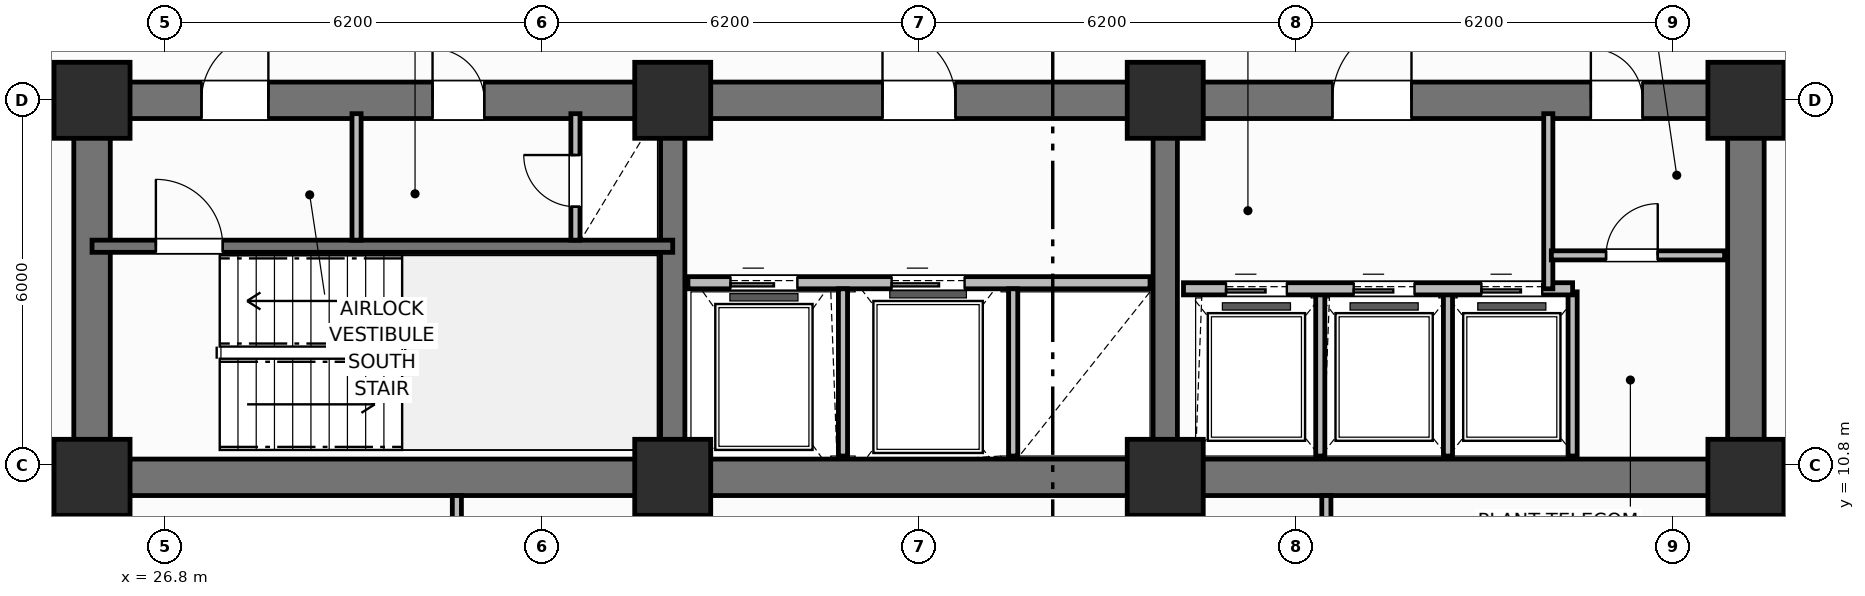
"""IFC4 building model, lengths in metres.
Left out: names, types, materials, properties, quantities, classifications, styles, units other than length and angle.
Written with IfcOpenShell. Run it as: python <this file> out.ifc"""

import sys

from ifc_helpers import new_model, si_unit, direction, frame, frame_2d, origin, origin_2d, place, context, subcontext, project, spatial, rectangle, extrude, element, fill, save


model = new_model("IFC4")
c1 = context("Model", 3, precision=1e-05, world=origin(), true_north=direction((0.0, 1.0)))
c2 = subcontext(c1, "Body", "Model", "MODEL_VIEW")
j1 = project(units=[si_unit("LENGTHUNIT", "METRE"), si_unit("PLANEANGLEUNIT", "RADIAN")], contexts=[c1])
p1 = place(None, origin())
s1 = spatial("IfcSite", under=j1, at=p1, CompositionType="ELEMENT")
p2 = place(p1, origin())
s2 = spatial("IfcBuilding", under=s1, at=p2, CompositionType="ELEMENT")
p3 = place(p2, frame((0.0, 0.0, 51.0)))
s3 = spatial("IfcBuildingStorey", under=s2, at=p3, CompositionType="ELEMENT", Elevation=51.0)
p4 = place(p3, frame((52.8, 10.6, 0.0), z_axis=(0.0, 0.0, 1.0), x_axis=(-1.0, 0.0, 0.0)))
e1 = element("IfcWall", 1, at=p4, inside=s3, PredefinedType="SHEAR", context=c2, shape_type="SweptSolid", body=[
    extrude(rectangle(XDim=27.2, YDim=0.6, at=frame_2d((13.6, 0.0))), origin(), (0.0, 0.0, 1.0), 3.7),
])
for number, where, z_axis, x_axis in (
    (2, (25.6, 10.9, 0.0), (0.0, 0.0, 1.0), (0.0, 1.0, 0.0)),
    (3, (52.8, 10.9, 0.0), (0.0, 0.0, 1.0), (0.0, 1.0, 0.0)),
):
    element("IfcWall", number, at=place(p3, frame(where, z_axis=z_axis, x_axis=x_axis)), inside=s3, PredefinedType="SHEAR", context=c2, shape_type="SweptSolid", body=[
        extrude(rectangle(XDim=5.6, YDim=0.6, at=frame_2d((2.8, 0.0))), origin(), (0.0, 0.0, 1.0), 3.7),
    ])
p5 = place(p3, frame((25.6, 16.8, 0.0), z_axis=(0.0, 0.0, 1.0), x_axis=(1.0, 0.0, 0.0)))
e4 = element("IfcWall", 4, at=p5, inside=s3, PredefinedType="SHEAR", context=c2, shape_type="SweptSolid", body=[
    extrude(rectangle(XDim=27.2, YDim=0.6, at=frame_2d((13.6, 0.0))), origin(), (0.0, 0.0, 1.0), 3.7),
])
p6 = place(p5, frame((1.8, 0.0, 0.0)))
e5 = element("IfcOpeningElement", 5, at=p6, cuts=e4, PredefinedType="OPENING", context=c2, shape_type="SweptSolid", body=[
    extrude(rectangle(XDim=1.1, YDim=2.15, at=frame_2d((0.55, 1.075))), frame((0.0, 0.31, 0.0), z_axis=(0.0, -1.0, 0.0), x_axis=(1.0, 0.0, 0.0)), (0.0, 0.0, 1.0), 0.62),
])
p7 = place(p5, frame((5.6, 0.0, 0.0)))
e6 = element("IfcOpeningElement", 6, at=p7, cuts=e4, PredefinedType="OPENING", context=c2, shape_type="SweptSolid", body=[
    extrude(rectangle(XDim=0.85, YDim=2.1, at=frame_2d((0.425, 1.05))), frame((0.0, 0.31, 0.0), z_axis=(0.0, -1.0, 0.0), x_axis=(1.0, 0.0, 0.0)), (0.0, 0.0, 1.0), 0.62),
])
p8 = place(p5, frame((13.0, 0.0, 0.0)))
e7 = element("IfcOpeningElement", 7, at=p8, cuts=e4, PredefinedType="OPENING", context=c2, shape_type="SweptSolid", body=[
    extrude(rectangle(XDim=1.2, YDim=2.15, at=frame_2d((0.6, 1.075))), frame((0.0, 0.31, 0.0), z_axis=(0.0, -1.0, 0.0), x_axis=(1.0, 0.0, 0.0)), (0.0, 0.0, 1.0), 0.62),
])
p9 = place(p5, frame((20.4, 0.0, 0.0)))
e8 = element("IfcOpeningElement", 8, at=p9, cuts=e4, PredefinedType="OPENING", context=c2, shape_type="SweptSolid", body=[
    extrude(rectangle(XDim=1.3, YDim=2.2, at=frame_2d((0.65, 1.1))), frame((0.0, 0.31, 0.0), z_axis=(0.0, -1.0, 0.0), x_axis=(1.0, 0.0, 0.0)), (0.0, 0.0, 1.0), 0.62),
])
p10 = place(p5, frame((24.65, 0.0, 0.0)))
e9 = element("IfcOpeningElement", 9, at=p10, cuts=e4, PredefinedType="OPENING", context=c2, shape_type="SweptSolid", body=[
    extrude(rectangle(XDim=0.85, YDim=2.1, at=frame_2d((0.425, 1.05))), frame((0.0, 0.31, 0.0), z_axis=(0.0, -1.0, 0.0), x_axis=(1.0, 0.0, 0.0)), (0.0, 0.0, 1.0), 0.62),
])
for number, where, z_axis, x_axis in (
    (10, (35.15, 10.9, 0.0), (0.0, 0.0, 1.0), (0.0, 1.0, 0.0)),
    (11, (43.25, 10.9, 0.0), (0.0, 0.0, 1.0), (0.0, 1.0, 0.0)),
):
    element("IfcWall", number, at=place(p3, frame(where, z_axis=z_axis, x_axis=x_axis)), inside=s3, PredefinedType="SHEAR", context=c2, shape_type="SweptSolid", body=[
        extrude(rectangle(XDim=5.6, YDim=0.4, at=frame_2d((2.8, 0.0))), origin(), (0.0, 0.0, 1.0), 3.7),
    ])
for number, where, z_axis, x_axis in (
    (12, (25.6, 10.6, 0.0), (0.0, 0.0, 1.0), (1.0, 0.0, 0.0)),
    (13, (25.6, 16.8, 0.0), (0.0, 0.0, 1.0), (1.0, 0.0, 0.0)),
    (14, (35.15, 10.6, 0.0), (0.0, 0.0, 1.0), (1.0, 0.0, 0.0)),
    (15, (35.15, 16.8, 0.0), (0.0, 0.0, 1.0), (1.0, 0.0, 0.0)),
    (16, (43.25, 10.6, 0.0), (0.0, 0.0, 1.0), (1.0, 0.0, 0.0)),
    (17, (43.25, 16.8, 0.0), (0.0, 0.0, 1.0), (1.0, 0.0, 0.0)),
    (18, (52.8, 10.6, 0.0), (0.0, 0.0, 1.0), (1.0, 0.0, 0.0)),
    (19, (52.8, 16.8, 0.0), (0.0, 0.0, 1.0), (1.0, 0.0, 0.0)),
):
    element("IfcColumn", number, at=place(p3, frame(where, z_axis=z_axis, x_axis=x_axis)), inside=s3, PredefinedType="COLUMN", context=c2, shape_type="SweptSolid", body=[
        extrude(rectangle(XDim=1.25, YDim=1.25, at=origin_2d()), origin(), (0.0, 0.0, 1.0), 3.7),
    ])
p11 = place(p3, frame((25.6, 14.4, 0.0), z_axis=(0.0, 0.0, 1.0), x_axis=(1.0, 0.0, 0.0)))
e20 = element("IfcWall", 20, at=p11, inside=s3, PredefinedType="SHEAR", context=c2, shape_type="SweptSolid", body=[
    extrude(rectangle(XDim=9.55, YDim=0.2, at=frame_2d((4.775, 0.0))), origin(), (0.0, 0.0, 1.0), 3.7),
])
p12 = place(p11, frame((1.05, 0.0, 0.0)))
e21 = element("IfcOpeningElement", 21, at=p12, cuts=e20, PredefinedType="OPENING", context=c2, shape_type="SweptSolid", body=[
    extrude(rectangle(XDim=1.1, YDim=2.15, at=frame_2d((0.55, 1.075))), frame((0.0, 0.11, 0.0), z_axis=(0.0, -1.0, 0.0), x_axis=(1.0, 0.0, 0.0)), (0.0, 0.0, 1.0), 0.22),
])
p13 = place(p3, frame((29.95, 14.5, 0.0), z_axis=(0.0, 0.0, 1.0), x_axis=(0.0, 1.0, 0.0)))
e22 = element("IfcWall", 22, at=p13, inside=s3, PredefinedType="PARTITIONING", context=c2, shape_type="SweptSolid", body=[
    extrude(rectangle(XDim=2.08, YDim=0.15, at=frame_2d((1.04, 0.0))), origin(), (0.0, 0.0, 1.0), 2.53),
])
p14 = place(p3, frame((33.55, 14.5, 0.0), z_axis=(0.0, 0.0, 1.0), x_axis=(0.0, 1.0, 0.0)))
e23 = element("IfcWall", 23, at=p14, inside=s3, PredefinedType="PARTITIONING", context=c2, shape_type="SweptSolid", body=[
    extrude(rectangle(XDim=2.08, YDim=0.15, at=frame_2d((1.04, 0.0))), origin(), (0.0, 0.0, 1.0), 2.53),
])
p15 = place(p14, frame((0.55, 0.0, 0.0)))
e24 = element("IfcOpeningElement", 24, at=p15, cuts=e23, PredefinedType="OPENING", context=c2, shape_type="SweptSolid", body=[
    extrude(rectangle(XDim=0.85, YDim=2.05, at=frame_2d((0.425, 1.025))), frame((0.0, 0.085, 0.0), z_axis=(0.0, -1.0, 0.0), x_axis=(1.0, 0.0, 0.0)), (0.0, 0.0, 1.0), 0.17),
])
p16 = place(p3, frame((35.4, 13.8, 0.0), z_axis=(0.0, 0.0, 1.0), x_axis=(1.0, 0.0, 0.0)))
e25 = element("IfcWall", 25, at=p16, inside=s3, PredefinedType="PARTITIONING", context=c2, shape_type="SweptSolid", body=[
    extrude(rectangle(XDim=7.6, YDim=0.2, at=frame_2d((3.8, 0.0))), origin(), (0.0, 0.0, 1.0), 2.3),
])
p17 = place(p16, frame((0.7, 0.0, 0.0)))
e26 = element("IfcOpeningElement", 26, at=p17, cuts=e25, PredefinedType="OPENING", context=c2, shape_type="SweptSolid", body=[
    extrude(rectangle(XDim=1.1, YDim=2.15, at=frame_2d((0.55, 1.075))), frame((0.0, 0.11, 0.0), z_axis=(0.0, -1.0, 0.0), x_axis=(1.0, 0.0, 0.0)), (0.0, 0.0, 1.0), 0.22),
])
p18 = place(p16, frame((3.35, 0.0, 0.0)))
e27 = element("IfcOpeningElement", 27, at=p18, cuts=e25, PredefinedType="OPENING", context=c2, shape_type="SweptSolid", body=[
    extrude(rectangle(XDim=1.2, YDim=2.15, at=frame_2d((0.6, 1.075))), frame((0.0, 0.11, 0.0), z_axis=(0.0, -1.0, 0.0), x_axis=(1.0, 0.0, 0.0)), (0.0, 0.0, 1.0), 0.22),
])
for number, where, z_axis, x_axis in (
    (28, (37.95, 10.95, 0.0), (0.0, 0.0, 1.0), (0.0, 1.0, 0.0)),
    (29, (40.75, 10.95, 0.0), (0.0, 0.0, 1.0), (0.0, 1.0, 0.0)),
):
    element("IfcWall", number, at=place(p3, frame(where, z_axis=z_axis, x_axis=x_axis)), inside=s3, PredefinedType="PARTITIONING", context=c2, shape_type="SweptSolid", body=[
        extrude(rectangle(XDim=2.75, YDim=0.15, at=frame_2d((1.375, 0.0))), origin(), (0.0, 0.0, 1.0), 2.53),
    ])
for number, where, z_axis, x_axis in (
    (30, (45.8, 10.95, 0.0), (0.0, 0.0, 1.0), (0.0, 1.0, 0.0)),
    (31, (47.9, 10.95, 0.0), (0.0, 0.0, 1.0), (0.0, 1.0, 0.0)),
    (32, (49.95, 10.95, 0.0), (0.0, 0.0, 1.0), (0.0, 1.0, 0.0)),
):
    element("IfcWall", number, at=place(p3, frame(where, z_axis=z_axis, x_axis=x_axis)), inside=s3, PredefinedType="PARTITIONING", context=c2, shape_type="SweptSolid", body=[
        extrude(rectangle(XDim=2.7, YDim=0.15, at=frame_2d((1.35, 0.0))), origin(), (0.0, 0.0, 1.0), 2.53),
    ])
p19 = place(p3, frame((43.55, 13.7, 0.0), z_axis=(0.0, 0.0, 1.0), x_axis=(1.0, 0.0, 0.0)))
e33 = element("IfcWall", 33, at=p19, inside=s3, PredefinedType="PARTITIONING", context=c2, shape_type="SweptSolid", body=[
    extrude(rectangle(XDim=6.4, YDim=0.2, at=frame_2d((3.2, 0.0))), origin(), (0.0, 0.0, 1.0), 2.53),
])
p20 = place(p19, frame((0.7, 0.0, 0.0)))
e34 = element("IfcOpeningElement", 34, at=p20, cuts=e33, PredefinedType="OPENING", context=c2, shape_type="SweptSolid", body=[
    extrude(rectangle(XDim=1.0, YDim=2.15, at=frame_2d((0.5, 1.075))), frame((0.0, 0.11, 0.0), z_axis=(0.0, -1.0, 0.0), x_axis=(1.0, 0.0, 0.0)), (0.0, 0.0, 1.0), 0.22),
])
p21 = place(p19, frame((2.8, 0.0, 0.0)))
e35 = element("IfcOpeningElement", 35, at=p21, cuts=e33, PredefinedType="OPENING", context=c2, shape_type="SweptSolid", body=[
    extrude(rectangle(XDim=1.0, YDim=2.15, at=frame_2d((0.5, 1.075))), frame((0.0, 0.11, 0.0), z_axis=(0.0, -1.0, 0.0), x_axis=(1.0, 0.0, 0.0)), (0.0, 0.0, 1.0), 0.22),
])
p22 = place(p19, frame((4.9, 0.0, 0.0)))
e36 = element("IfcOpeningElement", 36, at=p22, cuts=e33, PredefinedType="OPENING", context=c2, shape_type="SweptSolid", body=[
    extrude(rectangle(XDim=1.0, YDim=2.15, at=frame_2d((0.5, 1.075))), frame((0.0, 0.11, 0.0), z_axis=(0.0, -1.0, 0.0), x_axis=(1.0, 0.0, 0.0)), (0.0, 0.0, 1.0), 0.22),
])
p23 = place(p3, frame((49.55, 13.7, 0.0), z_axis=(0.0, 0.0, 1.0), x_axis=(0.0, 1.0, 0.0)))
e37 = element("IfcWall", 37, at=p23, inside=s3, PredefinedType="PARTITIONING", context=c2, shape_type="SweptSolid", body=[
    extrude(rectangle(XDim=2.88, YDim=0.15, at=frame_2d((1.44, 0.0))), origin(), (0.0, 0.0, 1.0), 2.53),
])
p24 = place(p3, frame((49.6, 14.25, 0.0), z_axis=(0.0, 0.0, 1.0), x_axis=(1.0, 0.0, 0.0)))
e38 = element("IfcWall", 38, at=p24, inside=s3, PredefinedType="PARTITIONING", context=c2, shape_type="SweptSolid", body=[
    extrude(rectangle(XDim=2.85, YDim=0.15, at=frame_2d((1.425, 0.0))), origin(), (0.0, 0.0, 1.0), 2.53),
])
p25 = place(p24, frame((0.9, 0.0, 0.0)))
e39 = element("IfcOpeningElement", 39, at=p25, cuts=e38, PredefinedType="OPENING", context=c2, shape_type="SweptSolid", body=[
    extrude(rectangle(XDim=0.85, YDim=2.1, at=frame_2d((0.425, 1.05))), frame((0.0, 0.085, 0.0), z_axis=(0.0, -1.0, 0.0), x_axis=(1.0, 0.0, 0.0)), (0.0, 0.0, 1.0), 0.17),
])
p26 = place(p3, frame((31.6, 4.97, 0.0), z_axis=(0.0, 0.0, 1.0), x_axis=(0.0, 1.0, 0.0)))
e40 = element("IfcWall", 40, at=p26, inside=s3, PredefinedType="PARTITIONING", context=c2, shape_type="SweptSolid", body=[
    extrude(rectangle(XDim=5.33, YDim=0.15, at=frame_2d((2.665, 0.0))), origin(), (0.0, 0.0, 1.0), 2.53),
])
p27 = place(p26, frame((1.95, 0.0, 0.0)))
e41 = element("IfcOpeningElement", 41, at=p27, cuts=e40, PredefinedType="OPENING", context=c2, shape_type="SweptSolid", body=[
    extrude(rectangle(XDim=0.9, YDim=2.1, at=frame_2d((0.45, 1.05))), frame((0.0, 0.085, 0.0), z_axis=(0.0, -1.0, 0.0), x_axis=(1.0, 0.0, 0.0)), (0.0, 0.0, 1.0), 0.17),
])
p28 = place(p3, frame((45.9, 4.97, 0.0), z_axis=(0.0, 0.0, 1.0), x_axis=(0.0, 1.0, 0.0)))
e42 = element("IfcWall", 42, at=p28, inside=s3, PredefinedType="PARTITIONING", context=c2, shape_type="SweptSolid", body=[
    extrude(rectangle(XDim=5.33, YDim=0.15, at=frame_2d((2.665, 0.0))), origin(), (0.0, 0.0, 1.0), 2.53),
])
p29 = place(p3, frame((25.4, 6.27, 0.0), z_axis=(0.0, 0.0, 1.0), x_axis=(0.0, 1.0, 0.0)))
e43 = element("IfcWall", 43, at=p29, inside=s3, PredefinedType="PARTITIONING", context=c2, shape_type="SweptSolid", body=[
    extrude(rectangle(XDim=4.03, YDim=0.2, at=frame_2d((2.015, 0.0))), origin(), (0.0, 0.0, 1.0), 2.53),
])
p30 = place(p29, frame((0.65, 0.0, 0.0)))
e44 = element("IfcOpeningElement", 44, at=p30, cuts=e43, PredefinedType="OPENING", context=c2, shape_type="SweptSolid", body=[
    extrude(rectangle(XDim=0.9, YDim=2.1, at=frame_2d((0.45, 1.05))), frame((0.0, 0.11, 0.0), z_axis=(0.0, -1.0, 0.0), x_axis=(1.0, 0.0, 0.0)), (0.0, 0.0, 1.0), 0.22),
])
p31 = place(p3, frame((53.0, 6.27, 0.0), z_axis=(0.0, 0.0, 1.0), x_axis=(0.0, 1.0, 0.0)))
e45 = element("IfcWall", 45, at=p31, inside=s3, PredefinedType="PARTITIONING", context=c2, shape_type="SweptSolid", body=[
    extrude(rectangle(XDim=4.03, YDim=0.2, at=frame_2d((2.015, 0.0))), origin(), (0.0, 0.0, 1.0), 2.53),
])
p32 = place(p31, frame((0.65, 0.0, 0.0)))
e46 = element("IfcOpeningElement", 46, at=p32, cuts=e45, PredefinedType="OPENING", context=c2, shape_type="SweptSolid", body=[
    extrude(rectangle(XDim=0.9, YDim=2.1, at=frame_2d((0.45, 1.05))), frame((0.0, 0.11, 0.0), z_axis=(0.0, -1.0, 0.0), x_axis=(1.0, 0.0, 0.0)), (0.0, 0.0, 1.0), 0.22),
])
p33 = place(p12, origin())
e47 = element("IfcDoor", 47, at=p33, inside=s3, OperationType="SINGLE_SWING_LEFT", PredefinedType="DOOR", context=c2, shape_type="SweptSolid", body=[
    extrude(rectangle(XDim=1.1, YDim=2.15, at=frame_2d((0.55, 1.075))), frame((0.0, 0.025, 0.0), z_axis=(0.0, -1.0, 0.0), x_axis=(1.0, 0.0, 0.0)), (0.0, 0.0, 1.0), 0.05),
])
fill(e21, e47)
p34 = place(p15, origin())
e48 = element("IfcDoor", 48, at=p34, inside=s3, OperationType="SINGLE_SWING_RIGHT", PredefinedType="TRAPDOOR", context=c2, shape_type="SweptSolid", body=[
    extrude(rectangle(XDim=0.85, YDim=2.05, at=frame_2d((0.425, 1.025))), frame((0.0, 0.025, 0.0), z_axis=(0.0, -1.0, 0.0), x_axis=(1.0, 0.0, 0.0)), (0.0, 0.0, 1.0), 0.05),
])
fill(e24, e48)
p35 = place(p17, origin())
e49 = element("IfcDoor", 49, at=p35, inside=s3, OperationType="SLIDING_TO_LEFT", PredefinedType="DOOR", context=c2, shape_type="SweptSolid", body=[
    extrude(rectangle(XDim=1.1, YDim=2.15, at=frame_2d((0.55, 1.075))), frame((0.0, 0.025, 0.0), z_axis=(0.0, -1.0, 0.0), x_axis=(1.0, 0.0, 0.0)), (0.0, 0.0, 1.0), 0.05),
])
fill(e26, e49)
p36 = place(p18, origin())
e50 = element("IfcDoor", 50, at=p36, inside=s3, OperationType="SLIDING_TO_LEFT", PredefinedType="DOOR", context=c2, shape_type="SweptSolid", body=[
    extrude(rectangle(XDim=1.2, YDim=2.15, at=frame_2d((0.6, 1.075))), frame((0.0, 0.025, 0.0), z_axis=(0.0, -1.0, 0.0), x_axis=(1.0, 0.0, 0.0)), (0.0, 0.0, 1.0), 0.05),
])
fill(e27, e50)
p37 = place(p20, origin())
e51 = element("IfcDoor", 51, at=p37, inside=s3, OperationType="SLIDING_TO_LEFT", PredefinedType="DOOR", context=c2, shape_type="SweptSolid", body=[
    extrude(rectangle(XDim=1.0, YDim=2.15, at=frame_2d((0.5, 1.075))), frame((0.0, 0.025, 0.0), z_axis=(0.0, -1.0, 0.0), x_axis=(1.0, 0.0, 0.0)), (0.0, 0.0, 1.0), 0.05),
])
fill(e34, e51)
p38 = place(p21, origin())
e52 = element("IfcDoor", 52, at=p38, inside=s3, OperationType="SLIDING_TO_LEFT", PredefinedType="DOOR", context=c2, shape_type="SweptSolid", body=[
    extrude(rectangle(XDim=1.0, YDim=2.15, at=frame_2d((0.5, 1.075))), frame((0.0, 0.025, 0.0), z_axis=(0.0, -1.0, 0.0), x_axis=(1.0, 0.0, 0.0)), (0.0, 0.0, 1.0), 0.05),
])
fill(e35, e52)
p39 = place(p22, origin())
e53 = element("IfcDoor", 53, at=p39, inside=s3, OperationType="SLIDING_TO_LEFT", PredefinedType="DOOR", context=c2, shape_type="SweptSolid", body=[
    extrude(rectangle(XDim=1.0, YDim=2.15, at=frame_2d((0.5, 1.075))), frame((0.0, 0.025, 0.0), z_axis=(0.0, -1.0, 0.0), x_axis=(1.0, 0.0, 0.0)), (0.0, 0.0, 1.0), 0.05),
])
fill(e36, e53)
p40 = place(p25, origin())
e54 = element("IfcDoor", 54, at=p40, inside=s3, OperationType="SINGLE_SWING_RIGHT", PredefinedType="DOOR", context=c2, shape_type="SweptSolid", body=[
    extrude(rectangle(XDim=0.85, YDim=2.1, at=frame_2d((0.425, 1.05))), frame((0.0, 0.025, 0.0), z_axis=(0.0, -1.0, 0.0), x_axis=(1.0, 0.0, 0.0)), (0.0, 0.0, 1.0), 0.05),
])
fill(e39, e54)
p41 = place(p6, origin())
e55 = element("IfcDoor", 55, at=p41, inside=s3, OperationType="SINGLE_SWING_RIGHT", PredefinedType="DOOR", context=c2, shape_type="SweptSolid", body=[
    extrude(rectangle(XDim=1.1, YDim=2.15, at=frame_2d((0.55, 1.075))), frame((0.0, 0.025, 0.0), z_axis=(0.0, -1.0, 0.0), x_axis=(1.0, 0.0, 0.0)), (0.0, 0.0, 1.0), 0.05),
])
fill(e5, e55)
p42 = place(p7, origin())
e56 = element("IfcDoor", 56, at=p42, inside=s3, OperationType="SINGLE_SWING_LEFT", PredefinedType="DOOR", context=c2, shape_type="SweptSolid", body=[
    extrude(rectangle(XDim=0.85, YDim=2.1, at=frame_2d((0.425, 1.05))), frame((0.0, 0.025, 0.0), z_axis=(0.0, -1.0, 0.0), x_axis=(1.0, 0.0, 0.0)), (0.0, 0.0, 1.0), 0.05),
])
fill(e6, e56)
p43 = place(p8, origin())
e57 = element("IfcDoor", 57, at=p43, inside=s3, OperationType="SINGLE_SWING_LEFT", PredefinedType="DOOR", context=c2, shape_type="SweptSolid", body=[
    extrude(rectangle(XDim=1.2, YDim=2.15, at=frame_2d((0.6, 1.075))), frame((0.0, 0.025, 0.0), z_axis=(0.0, -1.0, 0.0), x_axis=(1.0, 0.0, 0.0)), (0.0, 0.0, 1.0), 0.05),
])
fill(e7, e57)
p44 = place(p9, origin())
e58 = element("IfcDoor", 58, at=p44, inside=s3, OperationType="SINGLE_SWING_RIGHT", PredefinedType="DOOR", context=c2, shape_type="SweptSolid", body=[
    extrude(rectangle(XDim=1.3, YDim=2.2, at=frame_2d((0.65, 1.1))), frame((0.0, 0.025, 0.0), z_axis=(0.0, -1.0, 0.0), x_axis=(1.0, 0.0, 0.0)), (0.0, 0.0, 1.0), 0.05),
])
fill(e8, e58)
p45 = place(p10, origin())
e59 = element("IfcDoor", 59, at=p45, inside=s3, OperationType="SINGLE_SWING_LEFT", PredefinedType="DOOR", context=c2, shape_type="SweptSolid", body=[
    extrude(rectangle(XDim=0.85, YDim=2.1, at=frame_2d((0.425, 1.05))), frame((0.0, 0.025, 0.0), z_axis=(0.0, -1.0, 0.0), x_axis=(1.0, 0.0, 0.0)), (0.0, 0.0, 1.0), 0.05),
])
fill(e9, e59)
save(model, sys.argv[1])
